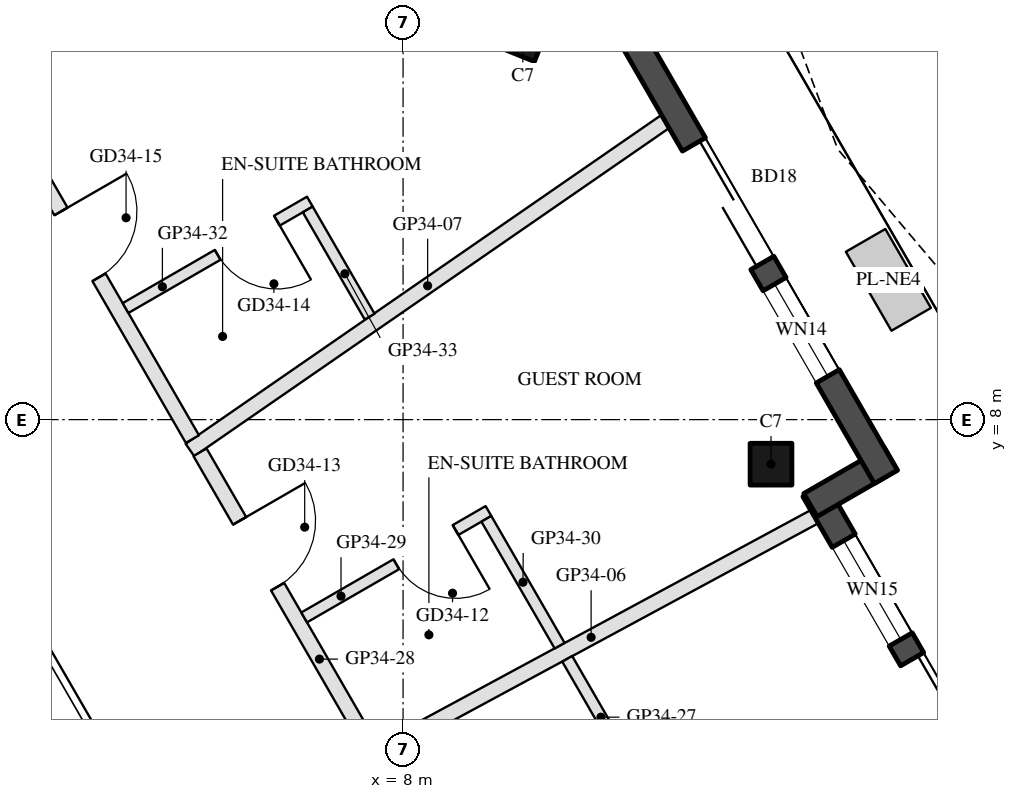
"""IFC4 building model, lengths in metres.
Left out: names, types, materials, properties, quantities, classifications, styles, units other than length and angle.
Written with IfcOpenShell. Run it as: python <this file> out.ifc"""

import sys

from ifc_helpers import new_model, si_unit, direction, frame, frame_2d, origin, origin_2d, place, context, subcontext, project, spatial, rectangle, hollow_rectangle, extrude, boolean, halfspace, element, fill, save


model = new_model("IFC4")
c1 = context("Model", 3, precision=1e-05, world=origin(), true_north=direction((0.0, 1.0)))
c2 = subcontext(c1, "Body", "Model", "MODEL_VIEW")
j1 = project(units=[si_unit("LENGTHUNIT", "METRE"), si_unit("PLANEANGLEUNIT", "RADIAN")], contexts=[c1])
p1 = place(None, origin())
s1 = spatial("IfcSite", under=j1, at=p1, CompositionType="ELEMENT")
p2 = place(p1, origin())
s2 = spatial("IfcBuilding", under=s1, at=p2, CompositionType="ELEMENT")
p3 = place(p2, frame((0.0, 0.0, 320.7)))
s3 = spatial("IfcBuildingStorey", under=s2, at=p3, CompositionType="ELEMENT", Elevation=320.7)
p4 = place(p3, frame((12.841, 7.414, 0.0), z_axis=(-0.1312281915, -0.075788846185, 0.9884509156), x_axis=(0.500239345249, -0.865887173376, 2.1159167e-05)))
e1 = element("IfcColumn", 1, at=p4, inside=s3, PredefinedType="COLUMN", context=c2, shape_type="SweptSolid", body=[
    boolean("DIFFERENCE", boolean("DIFFERENCE", extrude(hollow_rectangle(XDim=0.55, YDim=0.55, WallThickness=0.025, at=origin_2d()), origin(), (0.0, 0.0, 1.0), 3.743), halfspace(frame((0.0, 0.0, 0.031), z_axis=(0.0, 0.0, 1.0), x_axis=(1.0, 0.0, 0.0)), True)), halfspace(frame((0.0, 0.0, 3.712), z_axis=(0.0, 0.0, 1.0), x_axis=(1.0, 0.0, 0.0)), False)),
])
p5 = place(p3, frame((9.576, 13.07, 0.0), z_axis=(-0.100582464937, -0.128315882454, 0.986619583252), x_axis=(-0.502859866582, 0.862221844537, 0.060872369628)))
e2 = element("IfcColumn", 2, at=p5, inside=s3, PredefinedType="COLUMN", context=c2, shape_type="SweptSolid", body=[
    boolean("DIFFERENCE", boolean("DIFFERENCE", extrude(hollow_rectangle(XDim=0.55, YDim=0.55, WallThickness=0.025, at=origin_2d()), origin(), (0.0, 0.0, 1.0), 3.75), halfspace(frame((0.0, 0.0, 0.034), z_axis=(0.0, 0.0, 1.0), x_axis=(1.0, 0.0, 0.0)), True)), halfspace(frame((0.0, 0.0, 3.716), z_axis=(0.0, 0.0, 1.0), x_axis=(1.0, 0.0, 0.0)), False)),
])
p6 = place(p3, frame((16.098, 2.423, 0.0), z_axis=(0.0, 0.0, 1.0), x_axis=(-0.499996591357, 0.866027371756, 0.0)))
e3 = element("IfcWall", 3, at=p6, inside=s3, PredefinedType="SOLIDWALL", context=c2, shape_type="SweptSolid", body=[
    extrude(rectangle(XDim=5.371, YDim=0.35, at=frame_2d((2.685, 0.0))), origin(), (0.0, 0.0, 1.0), 3.55),
])
p7 = place(p6, frame((1.0, 0.0, 0.0)))
e4 = element("IfcOpeningElement", 4, at=p7, cuts=e3, PredefinedType="OPENING", context=c2, shape_type="SweptSolid", body=[
    extrude(rectangle(XDim=1.8, YDim=2.4, at=frame_2d((0.9, 1.2))), frame((0.0, 0.185, 0.0), z_axis=(0.0, -1.0, 0.0), x_axis=(1.0, 0.0, 0.0)), (0.0, 0.0, 1.0), 0.37),
])
p8 = place(p6, frame((3.1, 0.0, 0.3)))
e5 = element("IfcOpeningElement", 5, at=p8, cuts=e3, PredefinedType="OPENING", context=c2, shape_type="SweptSolid", body=[
    extrude(rectangle(XDim=1.5, YDim=2.65, at=frame_2d((0.75, 1.325))), frame((0.0, 0.185, 0.0), z_axis=(0.0, -1.0, 0.0), x_axis=(1.0, 0.0, 0.0)), (0.0, 0.0, 1.0), 0.37),
])
p9 = place(p3, frame((13.359, 6.876, 0.0), z_axis=(0.0, 0.0, 1.0), x_axis=(0.866092288191, 0.499884134912, 0.0)))
e6 = element("IfcWall", 6, at=p9, inside=s3, PredefinedType="SOLIDWALL", context=c2, shape_type="SweptSolid", body=[
    extrude(rectangle(XDim=1.22, YDim=0.35, at=frame_2d((0.61, 0.0))), origin(), (0.0, 0.0, 1.0), 3.55),
])
p10 = place(p3, frame((14.352, 7.247, 0.0), z_axis=(0.0, 0.0, 1.0), x_axis=(-0.499993893925, 0.8660289291, 0.0)))
e7 = element("IfcWall", 7, at=p10, inside=s3, PredefinedType="SOLIDWALL", context=c2, shape_type="SweptSolid", body=[
    extrude(rectangle(XDim=8.331, YDim=0.35, at=frame_2d((4.165, 0.0))), origin(), (0.0, 0.0, 1.0), 3.55),
])
p11 = place(p10, frame((3.25, 0.0, 0.0)))
e8 = element("IfcOpeningElement", 8, at=p11, cuts=e7, PredefinedType="OPENING", context=c2, shape_type="SweptSolid", body=[
    extrude(rectangle(XDim=1.8, YDim=2.4, at=frame_2d((0.9, 1.2))), frame((0.0, 0.185, 0.0), z_axis=(0.0, -1.0, 0.0), x_axis=(1.0, 0.0, 0.0)), (0.0, 0.0, 1.0), 0.37),
])
p12 = place(p10, frame((1.528, 0.0, 0.3)))
e9 = element("IfcOpeningElement", 9, at=p12, cuts=e7, PredefinedType="OPENING", context=c2, shape_type="SweptSolid", body=[
    extrude(rectangle(XDim=1.4, YDim=2.65, at=frame_2d((0.7, 1.325))), frame((0.0, 0.185, 0.0), z_axis=(0.0, -1.0, 0.0), x_axis=(1.0, 0.0, 0.0)), (0.0, 0.0, 1.0), 0.37),
])
p13 = place(p3, frame((13.413, 6.723, 0.0), z_axis=(0.0, 0.0, 1.0), x_axis=(-0.879890728885, -0.475176078126, 0.0)))
e10 = element("IfcWall", 10, at=p13, inside=s3, PredefinedType="PARTITIONING", context=c2, shape_type="SweptSolid", body=[
    extrude(rectangle(XDim=6.68, YDim=0.2, at=frame_2d((3.34, 0.0))), origin(), (0.0, 0.0, 1.0), 3.1),
])
p14 = place(p3, frame((11.45, 11.923, 0.0), z_axis=(0.0, 0.0, 1.0), x_axis=(-0.822640491705, -0.56856188881, 0.0)))
e11 = element("IfcWall", 11, at=p14, inside=s3, PredefinedType="PARTITIONING", context=c2, shape_type="SweptSolid", body=[
    extrude(rectangle(XDim=7.603, YDim=0.2, at=frame_2d((3.801, 0.0))), origin(), (0.0, 0.0, 1.0), 3.1),
])
p15 = place(p3, frame((11.046, 3.317, 0.0), z_axis=(0.0, 0.0, 1.0), x_axis=(-0.499960902066, 0.86604797581, 0.0)))
e12 = element("IfcWall", 12, at=p15, inside=s3, PredefinedType="PARTITIONING", context=c2, shape_type="SweptSolid", body=[
    extrude(rectangle(XDim=1.773, YDim=0.15, at=frame_2d((0.886, 0.0))), origin(), (0.0, 0.0, 1.0), 3.55),
])
p16 = place(p3, frame((5.329, 7.57, 0.0), z_axis=(0.0, 0.0, 1.0), x_axis=(0.49999394914, -0.866028897222, 0.0)))
e13 = element("IfcWall", 13, at=p16, inside=s3, PredefinedType="PARTITIONING", context=c2, shape_type="SweptSolid", body=[
    extrude(rectangle(XDim=4.489, YDim=0.2, at=frame_2d((2.244, 0.0))), origin(), (0.0, 0.0, 1.0), 3.15),
])
p17 = place(p16, frame((1.042, 0.0, 0.0)))
e14 = element("IfcOpeningElement", 14, at=p17, cuts=e13, PredefinedType="OPENING", context=c2, shape_type="SweptSolid", body=[
    extrude(rectangle(XDim=1.0, YDim=2.1, at=frame_2d((0.5, 1.05))), frame((0.0, 0.11, 0.0), z_axis=(0.0, -1.0, 0.0), x_axis=(1.0, 0.0, 0.0)), (0.0, 0.0, 1.0), 0.22),
])
p18 = place(p3, frame((9.124, 6.798, 0.0), z_axis=(0.0, 0.0, 1.0), x_axis=(-0.865996816683, -0.500049511043, 0.0)))
e15 = element("IfcWall", 15, at=p18, inside=s3, PredefinedType="PARTITIONING", context=c2, shape_type="SweptSolid", body=[
    extrude(rectangle(XDim=2.8, YDim=0.15, at=frame_2d((1.4, 0.0))), origin(), (0.0, 0.0, 1.0), 3.55),
])
p19 = place(p18, frame((0.5, 0.0, 0.0)))
e16 = element("IfcOpeningElement", 16, at=p19, cuts=e15, PredefinedType="OPENING", context=c2, shape_type="SweptSolid", body=[
    extrude(rectangle(XDim=0.9, YDim=2.1, at=frame_2d((0.45, 1.05))), frame((0.0, 0.085, 0.0), z_axis=(0.0, -1.0, 0.0), x_axis=(1.0, 0.0, 0.0)), (0.0, 0.0, 1.0), 0.17),
])
p20 = place(p3, frame((10.06, 5.026, 0.0), z_axis=(0.0, 0.0, 1.0), x_axis=(-0.499912496227, 0.866075918217, 0.0)))
e17 = element("IfcWall", 17, at=p20, inside=s3, PredefinedType="PARTITIONING", context=c2, shape_type="SweptSolid", body=[
    extrude(rectangle(XDim=1.927, YDim=0.15, at=frame_2d((0.964, 0.0))), origin(), (0.0, 0.0, 1.0), 3.15),
])
p21 = place(p3, frame((2.281, 12.85, 0.0), z_axis=(0.0, 0.0, 1.0), x_axis=(0.499991277142, -0.86603043987, 0.0)))
e18 = element("IfcWall", 18, at=p21, inside=s3, PredefinedType="PARTITIONING", context=c2, shape_type="SweptSolid", body=[
    extrude(rectangle(XDim=5.896, YDim=0.2, at=frame_2d((2.948, 0.0))), origin(), (0.0, 0.0, 1.0), 3.15),
])
p22 = place(p21, frame((2.438, 0.0, 0.0)))
e19 = element("IfcOpeningElement", 19, at=p22, cuts=e18, PredefinedType="OPENING", context=c2, shape_type="SweptSolid", body=[
    extrude(rectangle(XDim=1.0, YDim=2.1, at=frame_2d((0.5, 1.05))), frame((0.0, 0.11, 0.0), z_axis=(0.0, -1.0, 0.0), x_axis=(1.0, 0.0, 0.0)), (0.0, 0.0, 1.0), 0.22),
])
p23 = place(p3, frame((6.773, 10.868, 0.0), z_axis=(0.0, 0.0, 1.0), x_axis=(-0.865996816683, -0.500049511043, 0.0)))
e20 = element("IfcWall", 20, at=p23, inside=s3, PredefinedType="PARTITIONING", context=c2, shape_type="SweptSolid", body=[
    extrude(rectangle(XDim=2.8, YDim=0.15, at=frame_2d((1.4, 0.0))), origin(), (0.0, 0.0, 1.0), 3.55),
])
p24 = place(p23, frame((0.5, 0.0, 0.0)))
e21 = element("IfcOpeningElement", 21, at=p24, cuts=e20, PredefinedType="OPENING", context=c2, shape_type="SweptSolid", body=[
    extrude(rectangle(XDim=0.9, YDim=2.1, at=frame_2d((0.45, 1.05))), frame((0.0, 0.085, 0.0), z_axis=(0.0, -1.0, 0.0), x_axis=(1.0, 0.0, 0.0)), (0.0, 0.0, 1.0), 0.17),
])
p25 = place(p3, frame((7.56, 9.355, 0.0), z_axis=(0.0, 0.0, 1.0), x_axis=(-0.500025283505, 0.866010805854, 0.0)))
e22 = element("IfcWall", 22, at=p25, inside=s3, PredefinedType="PARTITIONING", context=c2, shape_type="SweptSolid", body=[
    extrude(rectangle(XDim=1.628, YDim=0.15, at=frame_2d((0.814, 0.0))), origin(), (0.0, 0.0, 1.0), 3.55),
])
p26 = place(p7, frame((1.8, 0.0, 0.0), z_axis=(0.0, 0.0, 1.0), x_axis=(-1.0, 0.0, 0.0)))
e23 = element("IfcDoor", 23, at=p26, inside=s3, OperationType="SLIDING_TO_LEFT", PredefinedType="DOOR", context=c2, shape_type="SweptSolid", body=[
    extrude(rectangle(XDim=1.8, YDim=2.4, at=frame_2d((0.9, 1.2))), frame((0.0, 0.025, 0.0), z_axis=(0.0, -1.0, 0.0), x_axis=(1.0, 0.0, 0.0)), (0.0, 0.0, 1.0), 0.05),
])
fill(e4, e23)
p27 = place(p8, origin())
e24 = element("IfcWindow", 24, at=p27, inside=s3, PartitioningType="SINGLE_PANEL", PredefinedType="WINDOW", context=c2, shape_type="SweptSolid", body=[
    extrude(rectangle(XDim=1.5, YDim=2.65, at=frame_2d((0.75, 1.325))), frame((0.0, 0.03, 0.0), z_axis=(0.0, -1.0, 0.0), x_axis=(1.0, 0.0, 0.0)), (0.0, 0.0, 1.0), 0.06),
])
fill(e5, e24)
p28 = place(p11, frame((1.8, 0.0, 0.0), z_axis=(0.0, 0.0, 1.0), x_axis=(-1.0, 0.0, 0.0)))
e25 = element("IfcDoor", 25, at=p28, inside=s3, OperationType="SLIDING_TO_LEFT", PredefinedType="DOOR", context=c2, shape_type="SweptSolid", body=[
    extrude(rectangle(XDim=1.8, YDim=2.4, at=frame_2d((0.9, 1.2))), frame((0.0, 0.025, 0.0), z_axis=(0.0, -1.0, 0.0), x_axis=(1.0, 0.0, 0.0)), (0.0, 0.0, 1.0), 0.05),
])
fill(e8, e25)
p29 = place(p12, origin())
e26 = element("IfcWindow", 26, at=p29, inside=s3, PartitioningType="SINGLE_PANEL", PredefinedType="WINDOW", context=c2, shape_type="SweptSolid", body=[
    extrude(rectangle(XDim=1.4, YDim=2.65, at=frame_2d((0.7, 1.325))), frame((0.0, 0.03, 0.0), z_axis=(0.0, -1.0, 0.0), x_axis=(1.0, 0.0, 0.0)), (0.0, 0.0, 1.0), 0.06),
])
fill(e9, e26)
p30 = place(p19, origin())
e27 = element("IfcDoor", 27, at=p30, inside=s3, OperationType="SINGLE_SWING_LEFT", PredefinedType="DOOR", context=c2, shape_type="SweptSolid", body=[
    extrude(rectangle(XDim=0.9, YDim=2.1, at=frame_2d((0.45, 1.05))), frame((0.0, 0.025, 0.0), z_axis=(0.0, -1.0, 0.0), x_axis=(1.0, 0.0, 0.0)), (0.0, 0.0, 1.0), 0.05),
])
fill(e16, e27)
p31 = place(p17, origin())
e28 = element("IfcDoor", 28, at=p31, inside=s3, OperationType="SINGLE_SWING_LEFT", PredefinedType="DOOR", context=c2, shape_type="SweptSolid", body=[
    extrude(rectangle(XDim=1.0, YDim=2.1, at=frame_2d((0.5, 1.05))), frame((0.0, 0.025, 0.0), z_axis=(0.0, -1.0, 0.0), x_axis=(1.0, 0.0, 0.0)), (0.0, 0.0, 1.0), 0.05),
])
fill(e14, e28)
p32 = place(p24, origin())
e29 = element("IfcDoor", 29, at=p32, inside=s3, OperationType="SINGLE_SWING_LEFT", PredefinedType="DOOR", context=c2, shape_type="SweptSolid", body=[
    extrude(rectangle(XDim=0.9, YDim=2.1, at=frame_2d((0.45, 1.05))), frame((0.0, 0.025, 0.0), z_axis=(0.0, -1.0, 0.0), x_axis=(1.0, 0.0, 0.0)), (0.0, 0.0, 1.0), 0.05),
])
fill(e21, e29)
p33 = place(p22, origin())
e30 = element("IfcDoor", 30, at=p33, inside=s3, OperationType="SINGLE_SWING_LEFT", PredefinedType="DOOR", context=c2, shape_type="SweptSolid", body=[
    extrude(rectangle(XDim=1.0, YDim=2.1, at=frame_2d((0.5, 1.05))), frame((0.0, 0.025, 0.0), z_axis=(0.0, -1.0, 0.0), x_axis=(1.0, 0.0, 0.0)), (0.0, 0.0, 1.0), 0.05),
])
fill(e19, e30)
save(model, sys.argv[1])
